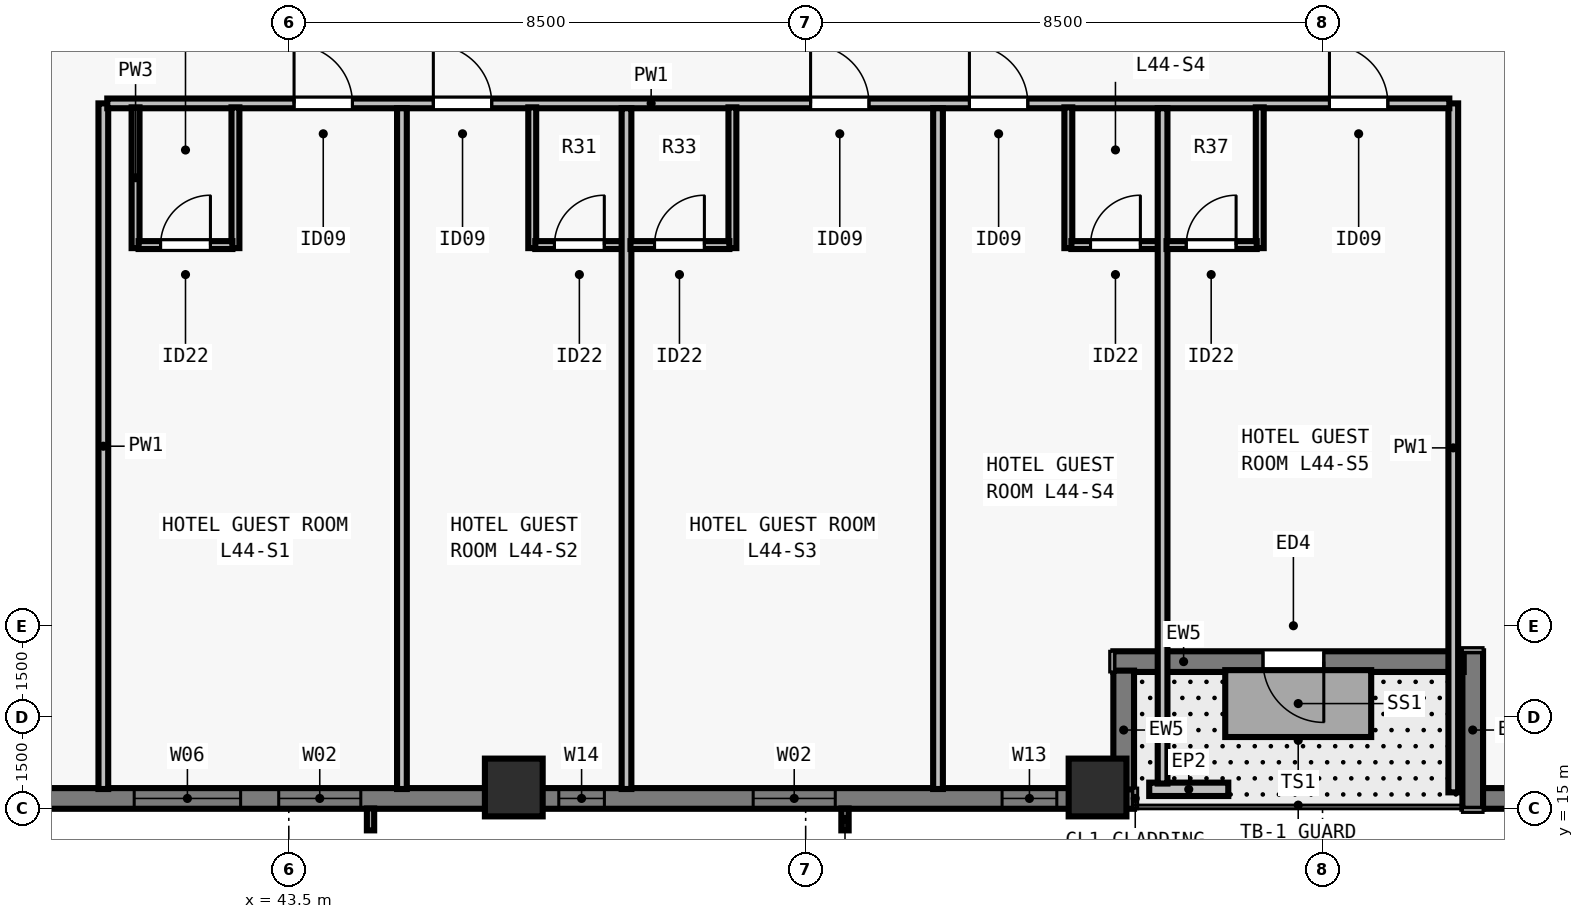
"""IFC4 building model, lengths in metres.
Left out: names, types, materials, properties, quantities, classifications, styles, units other than length and angle.
Written with IfcOpenShell. Run it as: python <this file> out.ifc"""

import sys

from ifc_helpers import new_model, si_unit, direction, frame, frame_2d, origin, origin_2d, place, context, subcontext, project, spatial, rectangle, extrude, element, fill, save


model = new_model("IFC4")
c1 = context("Model", 3, precision=1e-05, world=origin(), true_north=direction((0.0, 1.0)))
c2 = subcontext(c1, "Body", "Model", "MODEL_VIEW")
j1 = project(units=[si_unit("LENGTHUNIT", "METRE"), si_unit("PLANEANGLEUNIT", "RADIAN")], contexts=[c1])
p1 = place(None, origin())
s1 = spatial("IfcSite", under=j1, at=p1, CompositionType="ELEMENT")
p2 = place(p1, origin())
s2 = spatial("IfcBuilding", under=s1, at=p2, CompositionType="ELEMENT")
p3 = place(p2, frame((0.0, 0.0, 162.0)))
s3 = spatial("IfcBuildingStorey", under=s2, at=p3, CompositionType="ELEMENT", Elevation=162.0)
for number, where, z_axis, x_axis in (
    (1, (47.2, 15.35, 0.0), (0.0, 0.0, 1.0), (1.0, 0.0, 0.0)),
    (2, (56.8, 15.35, 0.0), (0.0, 0.0, 1.0), (1.0, 0.0, 0.0)),
):
    element("IfcColumn", number, at=place(p3, frame(where, z_axis=z_axis, x_axis=x_axis)), inside=s3, PredefinedType="COLUMN", context=c2, shape_type="SweptSolid", body=[
        extrude(rectangle(XDim=0.95, YDim=0.95, at=origin_2d()), origin(), (0.0, 0.0, 1.0), 3.5),
    ])
p4 = place(p3, frame((57.4, 15.17, 0.0), z_axis=(0.0, 0.0, 1.0), x_axis=(-1.0, 0.0, 0.0)))
e3 = element("IfcWall", 3, at=p4, inside=s3, PredefinedType="SOLIDWALL", context=c2, shape_type="SweptSolid", body=[
    extrude(rectangle(XDim=25.082, YDim=0.34, at=frame_2d((12.541, 0.0))), origin(), (0.0, 0.0, 1.0), 3.28),
])
p5 = place(p4, frame((4.913, 0.0, 0.8)))
e4 = element("IfcOpeningElement", 4, at=p5, cuts=e3, PredefinedType="OPENING", context=c2, shape_type="SweptSolid", body=[
    extrude(rectangle(XDim=1.35, YDim=1.66, at=frame_2d((0.675, 0.83))), frame((0.0, 0.18, 0.0), z_axis=(0.0, -1.0, 0.0), x_axis=(1.0, 0.0, 0.0)), (0.0, 0.0, 1.0), 0.36),
])
p6 = place(p4, frame((12.716, 0.0, 0.8)))
e5 = element("IfcOpeningElement", 5, at=p6, cuts=e3, PredefinedType="OPENING", context=c2, shape_type="SweptSolid", body=[
    extrude(rectangle(XDim=1.35, YDim=1.66, at=frame_2d((0.675, 0.83))), frame((0.0, 0.18, 0.0), z_axis=(0.0, -1.0, 0.0), x_axis=(1.0, 0.0, 0.0)), (0.0, 0.0, 1.0), 0.36),
])
p7 = place(p4, frame((14.692, 0.0, 0.8)))
e6 = element("IfcOpeningElement", 6, at=p7, cuts=e3, PredefinedType="OPENING", context=c2, shape_type="SweptSolid", body=[
    extrude(rectangle(XDim=1.75, YDim=1.66, at=frame_2d((0.875, 0.83))), frame((0.0, 0.18, 0.0), z_axis=(0.0, -1.0, 0.0), x_axis=(1.0, 0.0, 0.0)), (0.0, 0.0, 1.0), 0.36),
])
p8 = place(p4, frame((19.669, 0.0, 0.8)))
e7 = element("IfcOpeningElement", 7, at=p8, cuts=e3, PredefinedType="OPENING", context=c2, shape_type="SweptSolid", body=[
    extrude(rectangle(XDim=1.35, YDim=1.66, at=frame_2d((0.675, 0.83))), frame((0.0, 0.18, 0.0), z_axis=(0.0, -1.0, 0.0), x_axis=(1.0, 0.0, 0.0)), (0.0, 0.0, 1.0), 0.36),
])
p9 = place(p4, frame((8.71, 0.0, 0.8)))
e8 = element("IfcOpeningElement", 8, at=p9, cuts=e3, PredefinedType="OPENING", context=c2, shape_type="SweptSolid", body=[
    extrude(rectangle(XDim=0.75, YDim=1.66, at=frame_2d((0.375, 0.83))), frame((0.0, 0.18, 0.0), z_axis=(0.0, -1.0, 0.0), x_axis=(1.0, 0.0, 0.0)), (0.0, 0.0, 1.0), 0.36),
])
p10 = place(p4, frame((1.27, 0.0, 0.8)))
e9 = element("IfcOpeningElement", 9, at=p10, cuts=e3, PredefinedType="OPENING", context=c2, shape_type="SweptSolid", body=[
    extrude(rectangle(XDim=0.9, YDim=1.66, at=frame_2d((0.45, 0.83))), frame((0.0, 0.18, 0.0), z_axis=(0.0, -1.0, 0.0), x_axis=(1.0, 0.0, 0.0)), (0.0, 0.0, 1.0), 0.36),
])
p11 = place(p3, frame((72.0, 15.17, 0.0), z_axis=(0.0, 0.0, 1.0), x_axis=(-1.0, 0.0, 0.0)))
e10 = element("IfcWall", 10, at=p11, inside=s3, PredefinedType="SOLIDWALL", context=c2, shape_type="SweptSolid", body=[
    extrude(rectangle(XDim=8.882, YDim=0.34, at=frame_2d((4.441, 0.0))), origin(), (0.0, 0.0, 1.0), 3.28),
])
p12 = place(p11, frame((5.516, 0.0, 0.8)))
e11 = element("IfcOpeningElement", 11, at=p12, cuts=e10, PredefinedType="OPENING", context=c2, shape_type="SweptSolid", body=[
    extrude(rectangle(XDim=1.35, YDim=1.66, at=frame_2d((0.675, 0.83))), frame((0.0, 0.18, 0.0), z_axis=(0.0, -1.0, 0.0), x_axis=(1.0, 0.0, 0.0)), (0.0, 0.0, 1.0), 0.36),
])
p13 = place(p3, frame((62.97, 15.0, 0.0), z_axis=(0.0, 0.0, 1.0), x_axis=(0.0, 1.0, 0.0)))
e12 = element("IfcWall", 12, at=p13, inside=s3, PredefinedType="SOLIDWALL", context=c2, shape_type="SweptSolid", body=[
    extrude(rectangle(XDim=2.59, YDim=0.34, at=frame_2d((1.295, 0.0))), origin(), (0.0, 0.0, 1.0), 3.28),
])
p14 = place(p3, frame((62.822, 17.42, 0.0), z_axis=(0.0, 0.0, 1.0), x_axis=(-1.0, 0.0, 0.0)))
e13 = element("IfcWall", 13, at=p14, inside=s3, PredefinedType="SOLIDWALL", context=c2, shape_type="SweptSolid", body=[
    extrude(rectangle(XDim=5.762, YDim=0.34, at=frame_2d((2.881, 0.0))), origin(), (0.0, 0.0, 1.0), 3.28),
])
p15 = place(p14, frame((2.301, 0.0, 0.0)))
e14 = element("IfcOpeningElement", 14, at=p15, cuts=e13, PredefinedType="OPENING", context=c2, shape_type="SweptSolid", body=[
    extrude(rectangle(XDim=1.0, YDim=2.15, at=frame_2d((0.5, 1.075))), frame((0.0, 0.18, 0.0), z_axis=(0.0, -1.0, 0.0), x_axis=(1.0, 0.0, 0.0)), (0.0, 0.0, 1.0), 0.36),
])
p16 = place(p3, frame((57.23, 17.272, 0.0), z_axis=(0.0, 0.0, 1.0), x_axis=(0.0, -1.0, 0.0)))
e15 = element("IfcWall", 15, at=p16, inside=s3, PredefinedType="SOLIDWALL", context=c2, shape_type="SweptSolid", body=[
    extrude(rectangle(XDim=1.954, YDim=0.34, at=frame_2d((0.977, 0.0))), origin(), (0.0, 0.0, 1.0), 3.28),
])
p17 = place(p3, frame((57.65, 15.32, 0.0), z_axis=(0.0, 0.0, 1.0), x_axis=(1.0, 0.0, 0.0)))
e16 = element("IfcWall", 16, at=p17, inside=s3, PredefinedType="PARAPET", context=c2, shape_type="SweptSolid", body=[
    extrude(rectangle(XDim=1.3, YDim=0.22, at=frame_2d((0.65, 0.0))), origin(), (0.0, 0.0, 1.0), 0.55),
])
p18 = place(p3, frame((40.45, 15.325, 0.0), z_axis=(0.0, 0.0, 1.0), x_axis=(0.0, 1.0, 0.0)))
e17 = element("IfcWall", 17, at=p18, inside=s3, PredefinedType="PARTITIONING", context=c2, shape_type="SweptSolid", body=[
    extrude(rectangle(XDim=11.275, YDim=0.16, at=frame_2d((5.638, 0.0))), origin(), (0.0, 0.0, 1.0), 2.555),
])
p19 = place(p3, frame((62.65, 15.27, 0.0), z_axis=(0.0, 0.0, 1.0), x_axis=(0.0, 1.0, 0.0)))
e18 = element("IfcWall", 18, at=p19, inside=s3, PredefinedType="PARTITIONING", context=c2, shape_type="SweptSolid", body=[
    extrude(rectangle(XDim=11.33, YDim=0.16, at=frame_2d((5.665, 0.0))), origin(), (0.0, 0.0, 1.0), 3.28),
])
p20 = place(p3, frame((40.515, 26.6, 0.0), z_axis=(0.0, 0.0, 1.0), x_axis=(1.0, 0.0, 0.0)))
e19 = element("IfcWall", 19, at=p20, inside=s3, PredefinedType="PARTITIONING", context=c2, shape_type="SweptSolid", body=[
    extrude(rectangle(XDim=22.07, YDim=0.16, at=frame_2d((11.035, 0.0))), origin(), (0.0, 0.0, 1.0), 3.28),
])
p21 = place(p20, frame((3.072, 0.0, 0.0)))
e20 = element("IfcOpeningElement", 20, at=p21, cuts=e19, PredefinedType="OPENING", context=c2, shape_type="SweptSolid", body=[
    extrude(rectangle(XDim=0.96, YDim=2.15, at=frame_2d((0.48, 1.075))), frame((0.0, 0.09, 0.0), z_axis=(0.0, -1.0, 0.0), x_axis=(1.0, 0.0, 0.0)), (0.0, 0.0, 1.0), 0.18),
])
p22 = place(p20, frame((5.362, 0.0, 0.0)))
e21 = element("IfcOpeningElement", 21, at=p22, cuts=e19, PredefinedType="OPENING", context=c2, shape_type="SweptSolid", body=[
    extrude(rectangle(XDim=0.96, YDim=2.15, at=frame_2d((0.48, 1.075))), frame((0.0, 0.09, 0.0), z_axis=(0.0, -1.0, 0.0), x_axis=(1.0, 0.0, 0.0)), (0.0, 0.0, 1.0), 0.18),
])
p23 = place(p20, frame((11.566, 0.0, 0.0)))
e22 = element("IfcOpeningElement", 22, at=p23, cuts=e19, PredefinedType="OPENING", context=c2, shape_type="SweptSolid", body=[
    extrude(rectangle(XDim=0.96, YDim=2.15, at=frame_2d((0.48, 1.075))), frame((0.0, 0.09, 0.0), z_axis=(0.0, -1.0, 0.0), x_axis=(1.0, 0.0, 0.0)), (0.0, 0.0, 1.0), 0.18),
])
p24 = place(p20, frame((14.178, 0.0, 0.0)))
e23 = element("IfcOpeningElement", 23, at=p24, cuts=e19, PredefinedType="OPENING", context=c2, shape_type="SweptSolid", body=[
    extrude(rectangle(XDim=0.96, YDim=2.15, at=frame_2d((0.48, 1.075))), frame((0.0, 0.09, 0.0), z_axis=(0.0, -1.0, 0.0), x_axis=(1.0, 0.0, 0.0)), (0.0, 0.0, 1.0), 0.18),
])
p25 = place(p20, frame((20.099, 0.0, 0.0)))
e24 = element("IfcOpeningElement", 24, at=p25, cuts=e19, PredefinedType="OPENING", context=c2, shape_type="SweptSolid", body=[
    extrude(rectangle(XDim=0.96, YDim=2.15, at=frame_2d((0.48, 1.075))), frame((0.0, 0.09, 0.0), z_axis=(0.0, -1.0, 0.0), x_axis=(1.0, 0.0, 0.0)), (0.0, 0.0, 1.0), 0.18),
])
for number, where, z_axis, x_axis in (
    (25, (40.98, 24.22, 0.0), (0.0, 0.0, 1.0), (0.0, 1.0, 0.0)),
    (26, (42.622, 24.22, 0.0), (0.0, 0.0, 1.0), (0.0, 1.0, 0.0)),
):
    element("IfcWall", number, at=place(p3, frame(where, z_axis=z_axis, x_axis=x_axis)), inside=s3, PredefinedType="PLUMBINGWALL", context=c2, shape_type="SweptSolid", body=[
        extrude(rectangle(XDim=2.315, YDim=0.13, at=frame_2d((1.157, 0.0))), origin(), (0.0, 0.0, 1.0), 3.28),
    ])
p26 = place(p3, frame((41.03, 24.27, 0.0), z_axis=(0.0, 0.0, 1.0), x_axis=(1.0, 0.0, 0.0)))
e27 = element("IfcWall", 27, at=p26, inside=s3, PredefinedType="PLUMBINGWALL", context=c2, shape_type="SweptSolid", body=[
    extrude(rectangle(XDim=1.542, YDim=0.13, at=frame_2d((0.771, 0.0))), origin(), (0.0, 0.0, 1.0), 3.28),
])
p27 = place(p26, frame((0.361, 0.0, 0.0)))
e28 = element("IfcOpeningElement", 28, at=p27, cuts=e27, PredefinedType="OPENING", context=c2, shape_type="SweptSolid", body=[
    extrude(rectangle(XDim=0.82, YDim=2.1, at=frame_2d((0.41, 1.05))), frame((0.0, 0.075, 0.0), z_axis=(0.0, -1.0, 0.0), x_axis=(1.0, 0.0, 0.0)), (0.0, 0.0, 1.0), 0.15),
])
p28 = place(p3, frame((45.361, 15.325, 0.0), z_axis=(0.0, 0.0, 1.0), x_axis=(0.0, 1.0, 0.0)))
e29 = element("IfcWall", 29, at=p28, inside=s3, PredefinedType="PARTITIONING", context=c2, shape_type="SweptSolid", body=[
    extrude(rectangle(XDim=11.195, YDim=0.16, at=frame_2d((5.598, 0.0))), origin(), (0.0, 0.0, 1.0), 3.28),
])
p29 = place(p3, frame((47.503, 24.22, 0.0), z_axis=(0.0, 0.0, 1.0), x_axis=(0.0, 1.0, 0.0)))
e30 = element("IfcWall", 30, at=p29, inside=s3, PredefinedType="PLUMBINGWALL", context=c2, shape_type="SweptSolid", body=[
    extrude(rectangle(XDim=2.315, YDim=0.13, at=frame_2d((1.157, 0.0))), origin(), (0.0, 0.0, 1.0), 3.28),
])
p30 = place(p3, frame((47.553, 24.27, 0.0), z_axis=(0.0, 0.0, 1.0), x_axis=(1.0, 0.0, 0.0)))
e31 = element("IfcWall", 31, at=p30, inside=s3, PredefinedType="PLUMBINGWALL", context=c2, shape_type="SweptSolid", body=[
    extrude(rectangle(XDim=1.55, YDim=0.13, at=frame_2d((0.775, 0.0))), origin(), (0.0, 0.0, 1.0), 3.28),
])
p31 = place(p30, frame((0.315, 0.0, 0.0)))
e32 = element("IfcOpeningElement", 32, at=p31, cuts=e31, PredefinedType="OPENING", context=c2, shape_type="SweptSolid", body=[
    extrude(rectangle(XDim=0.82, YDim=2.1, at=frame_2d((0.41, 1.05))), frame((0.0, 0.075, 0.0), z_axis=(0.0, -1.0, 0.0), x_axis=(1.0, 0.0, 0.0)), (0.0, 0.0, 1.0), 0.15),
])
p32 = place(p3, frame((49.053, 15.325, 0.0), z_axis=(0.0, 0.0, 1.0), x_axis=(0.0, 1.0, 0.0)))
e33 = element("IfcWall", 33, at=p32, inside=s3, PredefinedType="PARTITIONING", context=c2, shape_type="SweptSolid", body=[
    extrude(rectangle(XDim=11.195, YDim=0.16, at=frame_2d((5.598, 0.0))), origin(), (0.0, 0.0, 1.0), 2.896),
])
p33 = place(p3, frame((50.795, 24.22, 0.0), z_axis=(0.0, 0.0, 1.0), x_axis=(0.0, 1.0, 0.0)))
e34 = element("IfcWall", 34, at=p33, inside=s3, PredefinedType="PLUMBINGWALL", context=c2, shape_type="SweptSolid", body=[
    extrude(rectangle(XDim=2.315, YDim=0.13, at=frame_2d((1.157, 0.0))), origin(), (0.0, 0.0, 1.0), 3.28),
])
p34 = place(p3, frame((49.118, 24.27, 0.0), z_axis=(0.0, 0.0, 1.0), x_axis=(1.0, 0.0, 0.0)))
e35 = element("IfcWall", 35, at=p34, inside=s3, PredefinedType="PLUMBINGWALL", context=c2, shape_type="SweptSolid", body=[
    extrude(rectangle(XDim=1.627, YDim=0.13, at=frame_2d((0.813, 0.0))), origin(), (0.0, 0.0, 1.0), 3.28),
])
p35 = place(p34, frame((0.396, 0.0, 0.0)))
e36 = element("IfcOpeningElement", 36, at=p35, cuts=e35, PredefinedType="OPENING", context=c2, shape_type="SweptSolid", body=[
    extrude(rectangle(XDim=0.82, YDim=2.1, at=frame_2d((0.41, 1.05))), frame((0.0, 0.075, 0.0), z_axis=(0.0, -1.0, 0.0), x_axis=(1.0, 0.0, 0.0)), (0.0, 0.0, 1.0), 0.15),
])
p36 = place(p3, frame((54.177, 15.325, 0.0), z_axis=(0.0, 0.0, 1.0), x_axis=(0.0, 1.0, 0.0)))
e37 = element("IfcWall", 37, at=p36, inside=s3, PredefinedType="PARTITIONING", context=c2, shape_type="SweptSolid", body=[
    extrude(rectangle(XDim=11.195, YDim=0.16, at=frame_2d((5.598, 0.0))), origin(), (0.0, 0.0, 1.0), 2.896),
])
p37 = place(p3, frame((56.32, 24.22, 0.0), z_axis=(0.0, 0.0, 1.0), x_axis=(0.0, 1.0, 0.0)))
e38 = element("IfcWall", 38, at=p37, inside=s3, PredefinedType="PLUMBINGWALL", context=c2, shape_type="SweptSolid", body=[
    extrude(rectangle(XDim=2.315, YDim=0.13, at=frame_2d((1.157, 0.0))), origin(), (0.0, 0.0, 1.0), 3.28),
])
p38 = place(p3, frame((56.369, 24.27, 0.0), z_axis=(0.0, 0.0, 1.0), x_axis=(1.0, 0.0, 0.0)))
e39 = element("IfcWall", 39, at=p38, inside=s3, PredefinedType="PLUMBINGWALL", context=c2, shape_type="SweptSolid", body=[
    extrude(rectangle(XDim=1.55, YDim=0.13, at=frame_2d((0.775, 0.0))), origin(), (0.0, 0.0, 1.0), 3.28),
])
p39 = place(p38, frame((0.315, 0.0, 0.0)))
e40 = element("IfcOpeningElement", 40, at=p39, cuts=e39, PredefinedType="OPENING", context=c2, shape_type="SweptSolid", body=[
    extrude(rectangle(XDim=0.82, YDim=2.1, at=frame_2d((0.41, 1.05))), frame((0.0, 0.075, 0.0), z_axis=(0.0, -1.0, 0.0), x_axis=(1.0, 0.0, 0.0)), (0.0, 0.0, 1.0), 0.15),
])
p40 = place(p3, frame((57.869, 15.415, 0.0), z_axis=(0.0, 0.0, 1.0), x_axis=(0.0, 1.0, 0.0)))
e41 = element("IfcWall", 41, at=p40, inside=s3, PredefinedType="PARTITIONING", context=c2, shape_type="SweptSolid", body=[
    extrude(rectangle(XDim=11.105, YDim=0.16, at=frame_2d((5.552, 0.0))), origin(), (0.0, 0.0, 1.0), 3.28),
])
p41 = place(p3, frame((59.468, 24.22, 0.0), z_axis=(0.0, 0.0, 1.0), x_axis=(0.0, 1.0, 0.0)))
e42 = element("IfcWall", 42, at=p41, inside=s3, PredefinedType="PLUMBINGWALL", context=c2, shape_type="SweptSolid", body=[
    extrude(rectangle(XDim=2.315, YDim=0.13, at=frame_2d((1.157, 0.0))), origin(), (0.0, 0.0, 1.0), 3.28),
])
p42 = place(p3, frame((57.935, 24.27, 0.0), z_axis=(0.0, 0.0, 1.0), x_axis=(1.0, 0.0, 0.0)))
e43 = element("IfcWall", 43, at=p42, inside=s3, PredefinedType="PLUMBINGWALL", context=c2, shape_type="SweptSolid", body=[
    extrude(rectangle(XDim=1.483, YDim=0.13, at=frame_2d((0.742, 0.0))), origin(), (0.0, 0.0, 1.0), 3.28),
])
p43 = place(p42, frame((0.324, 0.0, 0.0)))
e44 = element("IfcOpeningElement", 44, at=p43, cuts=e43, PredefinedType="OPENING", context=c2, shape_type="SweptSolid", body=[
    extrude(rectangle(XDim=0.82, YDim=2.1, at=frame_2d((0.41, 1.05))), frame((0.0, 0.075, 0.0), z_axis=(0.0, -1.0, 0.0), x_axis=(1.0, 0.0, 0.0)), (0.0, 0.0, 1.0), 0.15),
])
p44 = place(p5, origin())
e45 = element("IfcWindow", 45, at=p44, inside=s3, PartitioningType="SINGLE_PANEL", PredefinedType="WINDOW", context=c2, shape_type="SweptSolid", body=[
    extrude(rectangle(XDim=1.35, YDim=1.66, at=frame_2d((0.675, 0.83))), frame((0.0, -0.05, 0.0), z_axis=(0.0, -1.0, 0.0), x_axis=(1.0, 0.0, 0.0)), (0.0, 0.0, 1.0), 0.06),
])
fill(e4, e45)
p45 = place(p6, origin())
e46 = element("IfcWindow", 46, at=p45, inside=s3, PartitioningType="SINGLE_PANEL", PredefinedType="WINDOW", context=c2, shape_type="SweptSolid", body=[
    extrude(rectangle(XDim=1.35, YDim=1.66, at=frame_2d((0.675, 0.83))), frame((0.0, -0.05, 0.0), z_axis=(0.0, -1.0, 0.0), x_axis=(1.0, 0.0, 0.0)), (0.0, 0.0, 1.0), 0.06),
])
fill(e5, e46)
p46 = place(p7, origin())
e47 = element("IfcWindow", 47, at=p46, inside=s3, PartitioningType="SINGLE_PANEL", PredefinedType="WINDOW", context=c2, shape_type="SweptSolid", body=[
    extrude(rectangle(XDim=1.75, YDim=1.66, at=frame_2d((0.875, 0.83))), frame((0.0, -0.05, 0.0), z_axis=(0.0, -1.0, 0.0), x_axis=(1.0, 0.0, 0.0)), (0.0, 0.0, 1.0), 0.06),
])
fill(e6, e47)
p47 = place(p15, origin())
e48 = element("IfcDoor", 48, at=p47, inside=s3, OperationType="SINGLE_SWING_LEFT", PredefinedType="DOOR", context=c2, shape_type="SweptSolid", body=[
    extrude(rectangle(XDim=1.0, YDim=2.15, at=frame_2d((0.5, 1.075))), frame((0.0, 0.025, 0.0), z_axis=(0.0, -1.0, 0.0), x_axis=(1.0, 0.0, 0.0)), (0.0, 0.0, 1.0), 0.05),
])
fill(e14, e48)
p48 = place(p9, origin())
e49 = element("IfcWindow", 49, at=p48, inside=s3, PartitioningType="SINGLE_PANEL", PredefinedType="WINDOW", context=c2, shape_type="SweptSolid", body=[
    extrude(rectangle(XDim=0.75, YDim=1.66, at=frame_2d((0.375, 0.83))), frame((0.0, -0.04, 0.0), z_axis=(0.0, -1.0, 0.0), x_axis=(1.0, 0.0, 0.0)), (0.0, 0.0, 1.0), 0.06),
])
fill(e8, e49)
p49 = place(p10, origin())
e50 = element("IfcWindow", 50, at=p49, inside=s3, PartitioningType="SINGLE_PANEL", PredefinedType="WINDOW", context=c2, shape_type="SweptSolid", body=[
    extrude(rectangle(XDim=0.9, YDim=1.66, at=frame_2d((0.45, 0.83))), frame((0.0, -0.04, 0.0), z_axis=(0.0, -1.0, 0.0), x_axis=(1.0, 0.0, 0.0)), (0.0, 0.0, 1.0), 0.06),
])
fill(e9, e50)
p50 = place(p27, origin())
e51 = element("IfcDoor", 51, at=p50, inside=s3, OperationType="SINGLE_SWING_RIGHT", PredefinedType="DOOR", context=c2, shape_type="SweptSolid", body=[
    extrude(rectangle(XDim=0.82, YDim=2.1, at=frame_2d((0.41, 1.05))), frame((0.0, 0.025, 0.0), z_axis=(0.0, -1.0, 0.0), x_axis=(1.0, 0.0, 0.0)), (0.0, 0.0, 1.0), 0.05),
])
fill(e28, e51)
p51 = place(p21, origin())
e52 = element("IfcDoor", 52, at=p51, inside=s3, OperationType="SINGLE_SWING_LEFT", PredefinedType="DOOR", context=c2, shape_type="SweptSolid", body=[
    extrude(rectangle(XDim=0.96, YDim=2.15, at=frame_2d((0.48, 1.075))), frame((0.0, 0.025, 0.0), z_axis=(0.0, -1.0, 0.0), x_axis=(1.0, 0.0, 0.0)), (0.0, 0.0, 1.0), 0.05),
])
fill(e20, e52)
p52 = place(p31, origin())
e53 = element("IfcDoor", 53, at=p52, inside=s3, OperationType="SINGLE_SWING_RIGHT", PredefinedType="DOOR", context=c2, shape_type="SweptSolid", body=[
    extrude(rectangle(XDim=0.82, YDim=2.1, at=frame_2d((0.41, 1.05))), frame((0.0, 0.025, 0.0), z_axis=(0.0, -1.0, 0.0), x_axis=(1.0, 0.0, 0.0)), (0.0, 0.0, 1.0), 0.05),
])
fill(e32, e53)
p53 = place(p22, origin())
e54 = element("IfcDoor", 54, at=p53, inside=s3, OperationType="SINGLE_SWING_LEFT", PredefinedType="DOOR", context=c2, shape_type="SweptSolid", body=[
    extrude(rectangle(XDim=0.96, YDim=2.15, at=frame_2d((0.48, 1.075))), frame((0.0, 0.025, 0.0), z_axis=(0.0, -1.0, 0.0), x_axis=(1.0, 0.0, 0.0)), (0.0, 0.0, 1.0), 0.05),
])
fill(e21, e54)
p54 = place(p35, origin())
e55 = element("IfcDoor", 55, at=p54, inside=s3, OperationType="SINGLE_SWING_RIGHT", PredefinedType="DOOR", context=c2, shape_type="SweptSolid", body=[
    extrude(rectangle(XDim=0.82, YDim=2.1, at=frame_2d((0.41, 1.05))), frame((0.0, 0.025, 0.0), z_axis=(0.0, -1.0, 0.0), x_axis=(1.0, 0.0, 0.0)), (0.0, 0.0, 1.0), 0.05),
])
fill(e36, e55)
p55 = place(p23, origin())
e56 = element("IfcDoor", 56, at=p55, inside=s3, OperationType="SINGLE_SWING_LEFT", PredefinedType="DOOR", context=c2, shape_type="SweptSolid", body=[
    extrude(rectangle(XDim=0.96, YDim=2.15, at=frame_2d((0.48, 1.075))), frame((0.0, 0.025, 0.0), z_axis=(0.0, -1.0, 0.0), x_axis=(1.0, 0.0, 0.0)), (0.0, 0.0, 1.0), 0.05),
])
fill(e22, e56)
p56 = place(p39, origin())
e57 = element("IfcDoor", 57, at=p56, inside=s3, OperationType="SINGLE_SWING_RIGHT", PredefinedType="DOOR", context=c2, shape_type="SweptSolid", body=[
    extrude(rectangle(XDim=0.82, YDim=2.1, at=frame_2d((0.41, 1.05))), frame((0.0, 0.025, 0.0), z_axis=(0.0, -1.0, 0.0), x_axis=(1.0, 0.0, 0.0)), (0.0, 0.0, 1.0), 0.05),
])
fill(e40, e57)
p57 = place(p24, origin())
e58 = element("IfcDoor", 58, at=p57, inside=s3, OperationType="SINGLE_SWING_LEFT", PredefinedType="DOOR", context=c2, shape_type="SweptSolid", body=[
    extrude(rectangle(XDim=0.96, YDim=2.15, at=frame_2d((0.48, 1.075))), frame((0.0, 0.025, 0.0), z_axis=(0.0, -1.0, 0.0), x_axis=(1.0, 0.0, 0.0)), (0.0, 0.0, 1.0), 0.05),
])
fill(e23, e58)
p58 = place(p43, origin())
e59 = element("IfcDoor", 59, at=p58, inside=s3, OperationType="SINGLE_SWING_RIGHT", PredefinedType="DOOR", context=c2, shape_type="SweptSolid", body=[
    extrude(rectangle(XDim=0.82, YDim=2.1, at=frame_2d((0.41, 1.05))), frame((0.0, 0.025, 0.0), z_axis=(0.0, -1.0, 0.0), x_axis=(1.0, 0.0, 0.0)), (0.0, 0.0, 1.0), 0.05),
])
fill(e44, e59)
p59 = place(p25, origin())
e60 = element("IfcDoor", 60, at=p59, inside=s3, OperationType="SINGLE_SWING_LEFT", PredefinedType="DOOR", context=c2, shape_type="SweptSolid", body=[
    extrude(rectangle(XDim=0.96, YDim=2.15, at=frame_2d((0.48, 1.075))), frame((0.0, 0.025, 0.0), z_axis=(0.0, -1.0, 0.0), x_axis=(1.0, 0.0, 0.0)), (0.0, 0.0, 1.0), 0.05),
])
fill(e24, e60)
save(model, sys.argv[1])
